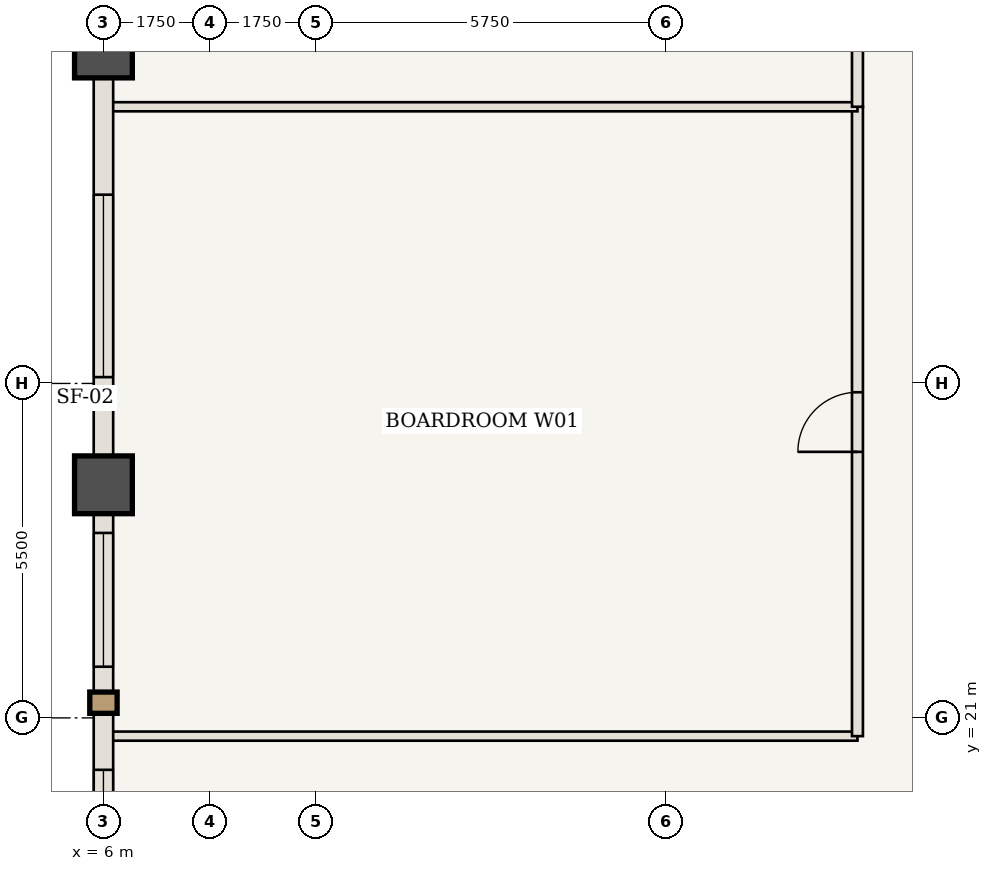
"""IFC4 building model, lengths in metres.
Left out: names, types, materials, properties, quantities, classifications, styles, units other than length and angle.
Written with IfcOpenShell. Run it as: python <this file> out.ifc"""

import sys

from ifc_helpers import new_model, si_unit, direction, frame, frame_2d, origin, origin_2d, place, context, subcontext, project, spatial, rectangle, extrude, element, fill, save


model = new_model("IFC4")
c1 = context("Model", 3, precision=1e-05, world=origin(), true_north=direction((0.0, 1.0)))
c2 = subcontext(c1, "Body", "Model", "MODEL_VIEW")
j1 = project(units=[si_unit("LENGTHUNIT", "METRE"), si_unit("PLANEANGLEUNIT", "RADIAN")], contexts=[c1])
p1 = place(None, origin())
s1 = spatial("IfcSite", under=j1, at=p1, CompositionType="ELEMENT")
p2 = place(p1, origin())
s2 = spatial("IfcBuilding", under=s1, at=p2, CompositionType="ELEMENT")
p3 = place(p2, frame((0.0, 0.0, 118.3)))
s3 = spatial("IfcBuildingStorey", under=s2, at=p3, CompositionType="ELEMENT", Elevation=118.3)
for number, where, z_axis, x_axis in (
    (1, (6.0, 24.833, 0.0), (0.0, 0.0, 1.0), (1.0, 0.0, 0.0)),
    (2, (6.0, 32.0, 0.0), (0.0, 0.0, 1.0), (1.0, 0.0, 0.0)),
):
    element("IfcColumn", number, at=place(p3, frame(where, z_axis=z_axis, x_axis=x_axis)), inside=s3, PredefinedType="COLUMN", context=c2, shape_type="SweptSolid", body=[
        extrude(rectangle(XDim=0.95, YDim=0.95, at=origin_2d()), origin(), (0.0, 0.0, 1.0), 3.85),
    ])
p4 = place(p3, frame((6.06, 20.7, 0.0), z_axis=(0.0, 0.0, 1.0), x_axis=(1.0, 0.0, 0.0)))
e3 = element("IfcWall", 3, at=p4, inside=s3, PredefinedType="STANDARD", context=c2, shape_type="SweptSolid", body=[
    extrude(rectangle(XDim=12.34, YDim=0.15, at=frame_2d((6.17, 0.0))), origin(), (0.0, 0.0, 1.0), 3.065),
])
p5 = place(p3, frame((18.4, 20.7, 0.0), z_axis=(0.0, 0.0, 1.0), x_axis=(0.0, 1.0, 0.0)))
e4 = element("IfcWall", 4, at=p5, inside=s3, PredefinedType="STANDARD", context=c2, shape_type="SweptSolid", body=[
    extrude(rectangle(XDim=10.35, YDim=0.18, at=frame_2d((5.175, 0.0))), origin(), (0.0, 0.0, 1.0), 3.685),
])
p6 = place(p5, frame((4.675, 0.0, 0.0)))
e5 = element("IfcOpeningElement", 5, at=p6, cuts=e4, PredefinedType="OPENING", context=c2, shape_type="SweptSolid", body=[
    extrude(rectangle(XDim=0.98, YDim=2.2, at=frame_2d((0.49, 1.1))), frame((0.0, 0.1, 0.0), z_axis=(0.0, -1.0, 0.0), x_axis=(1.0, 0.0, 0.0)), (0.0, 0.0, 1.0), 0.2),
])
p7 = place(p3, frame((6.06, 31.05, 0.0), z_axis=(0.0, 0.0, 1.0), x_axis=(1.0, 0.0, 0.0)))
e6 = element("IfcWall", 6, at=p7, inside=s3, PredefinedType="STANDARD", context=c2, shape_type="SweptSolid", body=[
    extrude(rectangle(XDim=12.34, YDim=0.15, at=frame_2d((6.17, 0.0))), origin(), (0.0, 0.0, 1.0), 3.685),
])
p8 = place(p3, frame((18.4, 31.05, 0.0), z_axis=(0.0, 0.0, 1.0), x_axis=(0.0, 1.0, 0.0)))
e7 = element("IfcWall", 7, at=p8, inside=s3, PredefinedType="STANDARD", context=c2, shape_type="SweptSolid", body=[
    extrude(rectangle(XDim=12.25, YDim=0.18, at=frame_2d((6.125, 0.0))), origin(), (0.0, 0.0, 1.0), 3.685),
])
p9 = place(p8, frame((5.625, 0.0, 0.0)))
e8 = element("IfcOpeningElement", 8, at=p9, cuts=e7, PredefinedType="OPENING", context=c2, shape_type="SweptSolid", body=[
    extrude(rectangle(XDim=0.98, YDim=2.2, at=frame_2d((0.49, 1.1))), frame((0.0, 0.1, 0.0), z_axis=(0.0, -1.0, 0.0), x_axis=(1.0, 0.0, 0.0)), (0.0, 0.0, 1.0), 0.2),
])
p10 = place(p3, frame((6.0, 17.667, 0.0), z_axis=(0.0, 0.0, 1.0), x_axis=(0.0, 1.0, 0.0)))
e9 = element("IfcWall", 9, at=p10, inside=s3, PredefinedType="USERDEFINED", context=c2, shape_type="SweptSolid", body=[
    extrude(rectangle(XDim=7.167, YDim=0.32, at=frame_2d((3.583, 0.0))), origin(), (0.0, 0.0, 1.0), 2.885),
])
p11 = place(p10, frame((0.879, 0.0, 0.85)))
e10 = element("IfcOpeningElement", 10, at=p11, cuts=e9, PredefinedType="OPENING", context=c2, shape_type="SweptSolid", body=[
    extrude(rectangle(XDim=1.6, YDim=1.835, at=frame_2d((0.8, 0.917))), frame((0.0, 0.17, 0.0), z_axis=(0.0, -1.0, 0.0), x_axis=(1.0, 0.0, 0.0)), (0.0, 0.0, 1.0), 0.34),
])
p12 = place(p10, frame((4.175, 0.0, 0.85)))
e11 = element("IfcOpeningElement", 11, at=p12, cuts=e9, PredefinedType="OPENING", context=c2, shape_type="SweptSolid", body=[
    extrude(rectangle(XDim=2.2, YDim=1.835, at=frame_2d((1.1, 0.917))), frame((0.0, 0.17, 0.0), z_axis=(0.0, -1.0, 0.0), x_axis=(1.0, 0.0, 0.0)), (0.0, 0.0, 1.0), 0.34),
])
p13 = place(p3, frame((6.0, 24.833, 0.0), z_axis=(0.0, 0.0, 1.0), x_axis=(0.0, 1.0, 0.0)))
e12 = element("IfcWall", 12, at=p13, inside=s3, PredefinedType="USERDEFINED", context=c2, shape_type="SweptSolid", body=[
    extrude(rectangle(XDim=7.167, YDim=0.32, at=frame_2d((3.583, 0.0))), origin(), (0.0, 0.0, 1.0), 2.885),
])
p14 = place(p13, frame((1.771, 0.0, 0.85)))
e13 = element("IfcOpeningElement", 13, at=p14, cuts=e12, PredefinedType="OPENING", context=c2, shape_type="SweptSolid", body=[
    extrude(rectangle(XDim=3.0, YDim=1.835, at=frame_2d((1.5, 0.917))), frame((0.0, 0.17, 0.0), z_axis=(0.0, -1.0, 0.0), x_axis=(1.0, 0.0, 0.0)), (0.0, 0.0, 1.0), 0.34),
])
p15 = place(p6, origin())
e14 = element("IfcDoor", 14, at=p15, inside=s3, OperationType="SINGLE_SWING_LEFT", PredefinedType="DOOR", context=c2, shape_type="SweptSolid", body=[
    extrude(rectangle(XDim=0.98, YDim=2.2, at=frame_2d((0.49, 1.1))), frame((0.0, 0.025, 0.0), z_axis=(0.0, -1.0, 0.0), x_axis=(1.0, 0.0, 0.0)), (0.0, 0.0, 1.0), 0.05),
])
fill(e5, e14)
p16 = place(p11, origin())
e15 = element("IfcWindow", 15, at=p16, inside=s3, PartitioningType="SINGLE_PANEL", PredefinedType="WINDOW", context=c2, shape_type="SweptSolid", body=[
    extrude(rectangle(XDim=1.6, YDim=1.835, at=frame_2d((0.8, 0.917))), frame((0.0, 0.03, 0.0), z_axis=(0.0, -1.0, 0.0), x_axis=(1.0, 0.0, 0.0)), (0.0, 0.0, 1.0), 0.06),
])
fill(e10, e15)
p17 = place(p12, origin())
e16 = element("IfcWindow", 16, at=p17, inside=s3, PartitioningType="SINGLE_PANEL", PredefinedType="WINDOW", context=c2, shape_type="SweptSolid", body=[
    extrude(rectangle(XDim=2.2, YDim=1.835, at=frame_2d((1.1, 0.917))), frame((0.0, 0.03, 0.0), z_axis=(0.0, -1.0, 0.0), x_axis=(1.0, 0.0, 0.0)), (0.0, 0.0, 1.0), 0.06),
])
fill(e11, e16)
p18 = place(p14, origin())
e17 = element("IfcWindow", 17, at=p18, inside=s3, PartitioningType="SINGLE_PANEL", PredefinedType="WINDOW", context=c2, shape_type="SweptSolid", body=[
    extrude(rectangle(XDim=3.0, YDim=1.835, at=frame_2d((1.5, 0.917))), frame((0.0, 0.03, 0.0), z_axis=(0.0, -1.0, 0.0), x_axis=(1.0, 0.0, 0.0)), (0.0, 0.0, 1.0), 0.06),
])
fill(e13, e17)
save(model, sys.argv[1])
